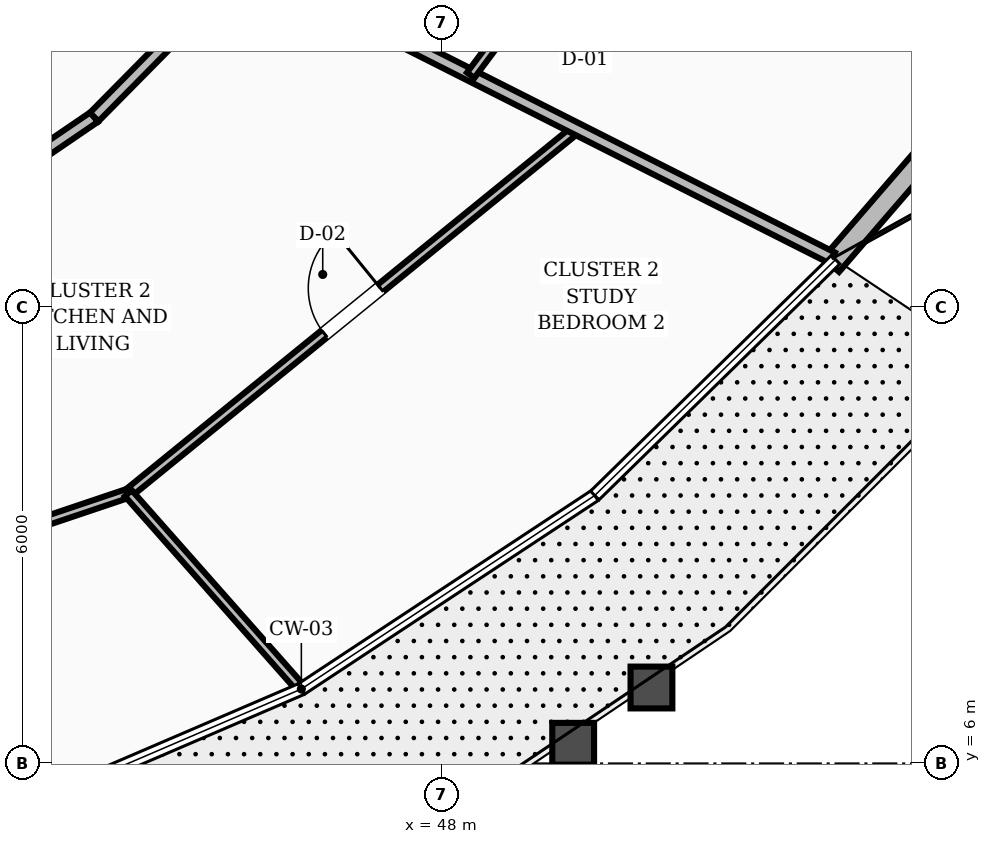
"""IFC4 building model, lengths in metres.
Left out: names, types, materials, properties, quantities, classifications, styles, units other than length and angle.
Written with IfcOpenShell. Run it as: python <this file> out.ifc"""

import sys

from ifc_helpers import new_model, si_unit, direction, frame, frame_2d, origin, place, context, subcontext, project, spatial, rectangle, extrude, element, fill, save


model = new_model("IFC4")
c1 = context("Model", 3, precision=1e-05, world=origin(), true_north=direction((0.0, 1.0)))
c2 = subcontext(c1, "Body", "Model", "MODEL_VIEW")
j1 = project(units=[si_unit("LENGTHUNIT", "METRE"), si_unit("PLANEANGLEUNIT", "RADIAN")], contexts=[c1])
p1 = place(None, origin())
s1 = spatial("IfcSite", under=j1, at=p1, CompositionType="ELEMENT")
p2 = place(p1, origin())
s2 = spatial("IfcBuilding", under=s1, at=p2, CompositionType="ELEMENT")
p3 = place(p2, frame((0.0, 0.0, 41.2)))
s3 = spatial("IfcBuildingStorey", under=s2, at=p3, CompositionType="ELEMENT", Elevation=41.2)
p4 = place(p3, frame((53.122, 12.555, 0.0), z_axis=(0.0, 0.0, 1.0), x_axis=(0.653570276047, 0.756865836372, 0.0)))
e1 = element("IfcWall", 1, at=p4, inside=s3, PredefinedType="STANDARD", context=c2, shape_type="SweptSolid", body=[
    extrude(rectangle(XDim=4.486, YDim=0.28, at=frame_2d((2.243, 0.0))), origin(), (0.0, 0.0, 1.0), 2.65),
])
p5 = place(p3, frame((40.979, 12.83, 0.0), z_axis=(0.0, 0.0, 1.0), x_axis=(0.826112340767, 0.563505457323, 0.0)))
e2 = element("IfcWall", 2, at=p5, inside=s3, PredefinedType="SOLIDWALL", context=c2, shape_type="SweptSolid", body=[
    extrude(rectangle(XDim=2.965, YDim=0.16, at=frame_2d((1.482, 0.0))), origin(), (0.0, 0.0, 1.0), 2.61),
])
p6 = place(p3, frame((43.428, 14.501, 0.0), z_axis=(0.0, 0.0, 1.0), x_axis=(0.702569520063, 0.711615113301, 0.0)))
e3 = element("IfcWall", 3, at=p6, inside=s3, PredefinedType="SOLIDWALL", context=c2, shape_type="SweptSolid", body=[
    extrude(rectangle(XDim=2.861, YDim=0.16, at=frame_2d((1.43, 0.0))), origin(), (0.0, 0.0, 1.0), 2.61),
])
p7 = place(p3, frame((36.17, 6.957, 0.0), z_axis=(0.0, 0.0, 1.0), x_axis=(0.947721167357, 0.319099653625, 0.0)))
e4 = element("IfcWall", 4, at=p7, inside=s3, PredefinedType="PARTITIONING", context=c2, shape_type="SweptSolid", body=[
    extrude(rectangle(XDim=8.131, YDim=0.12, at=frame_2d((4.066, 0.0))), origin(), (0.0, 0.0, 1.0), 2.61),
])
p8 = place(p7, frame((4.977, 0.0, 0.0)))
e5 = element("IfcOpeningElement", 5, at=p8, cuts=e4, PredefinedType="OPENING", context=c2, shape_type="SweptSolid", body=[
    extrude(rectangle(XDim=0.95, YDim=2.1, at=frame_2d((0.475, 1.05))), frame((0.0, 0.07, 0.0), z_axis=(0.0, -1.0, 0.0), x_axis=(1.0, 0.0, 0.0)), (0.0, 0.0, 1.0), 0.14),
])
p9 = place(p3, frame((43.877, 9.552, 0.0), z_axis=(0.0, 0.0, 1.0), x_axis=(0.775978393893, 0.630759488404, 0.0)))
e6 = element("IfcWall", 6, at=p9, inside=s3, PredefinedType="PARTITIONING", context=c2, shape_type="SweptSolid", body=[
    extrude(rectangle(XDim=7.601, YDim=0.12, at=frame_2d((3.8, 0.0))), origin(), (0.0, 0.0, 1.0), 2.61),
])
p10 = place(p9, frame((3.325, 0.0, 0.0)))
e7 = element("IfcOpeningElement", 7, at=p10, cuts=e6, PredefinedType="OPENING", context=c2, shape_type="SweptSolid", body=[
    extrude(rectangle(XDim=0.95, YDim=2.1, at=frame_2d((0.475, 1.05))), frame((0.0, 0.07, 0.0), z_axis=(0.0, -1.0, 0.0), x_axis=(1.0, 0.0, 0.0)), (0.0, 0.0, 1.0), 0.14),
])
p11 = place(p3, frame((43.877, 9.552, 0.0), z_axis=(0.0, 0.0, 1.0), x_axis=(0.662205323819, -0.74932243334, 0.0)))
e8 = element("IfcWall", 8, at=p11, inside=s3, PredefinedType="PARTITIONING", context=c2, shape_type="SweptSolid", body=[
    extrude(rectangle(XDim=3.388, YDim=0.12, at=frame_2d((1.694, 0.0))), origin(), (0.0, 0.0, 1.0), 2.61),
])
p12 = place(p3, frame((45.438, 16.537, 0.0), z_axis=(0.0, 0.0, 1.0), x_axis=(0.892562807144, -0.450923092448, 0.0)))
e9 = element("IfcWall", 9, at=p12, inside=s3, PredefinedType="SOLIDWALL", context=c2, shape_type="SweptSolid", body=[
    extrude(rectangle(XDim=8.626, YDim=0.16, at=frame_2d((4.313, 0.0))), origin(), (0.0, 0.0, 1.0), 2.61),
])
p13 = place(p3, frame((48.381, 15.05, 0.0), z_axis=(0.0, 0.0, 1.0), x_axis=(0.597948418231, 0.801534583867, 0.0)))
e10 = element("IfcWall", 10, at=p13, inside=s3, PredefinedType="PARTITIONING", context=c2, shape_type="SweptSolid", body=[
    extrude(rectangle(XDim=3.373, YDim=0.12, at=frame_2d((1.687, 0.0))), origin(), (0.0, 0.0, 1.0), 2.61),
])
p14 = place(p13, frame((1.257, 0.0, 0.0)))
e11 = element("IfcOpeningElement", 11, at=p14, cuts=e10, PredefinedType="OPENING", context=c2, shape_type="SweptSolid", body=[
    extrude(rectangle(XDim=0.86, YDim=2.1, at=frame_2d((0.43, 1.05))), frame((0.0, 0.07, 0.0), z_axis=(0.0, -1.0, 0.0), x_axis=(1.0, 0.0, 0.0)), (0.0, 0.0, 1.0), 0.14),
])
p15 = place(p10, origin())
e12 = element("IfcDoor", 12, at=p15, inside=s3, OperationType="SINGLE_SWING_RIGHT", PredefinedType="DOOR", context=c2, shape_type="SweptSolid", body=[
    extrude(rectangle(XDim=0.95, YDim=2.1, at=frame_2d((0.475, 1.05))), frame((0.0, 0.025, 0.0), z_axis=(0.0, -1.0, 0.0), x_axis=(1.0, 0.0, 0.0)), (0.0, 0.0, 1.0), 0.05),
])
fill(e7, e12)
save(model, sys.argv[1])
